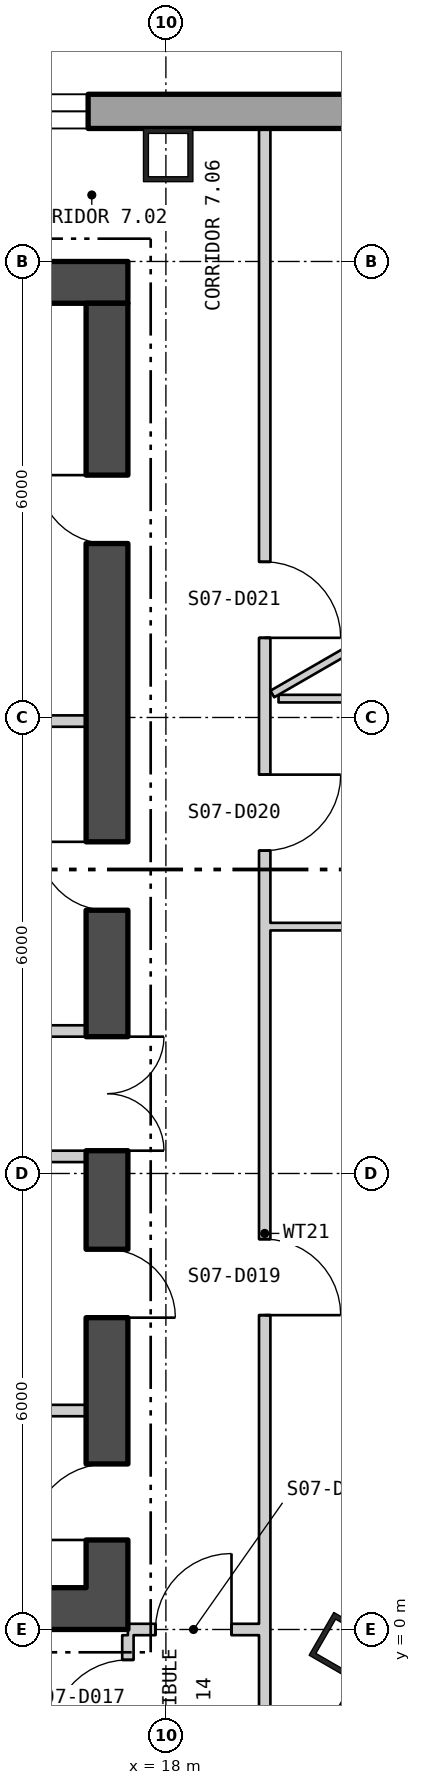
"""IFC4 building model, lengths in metres.
Left out: names, types, materials, properties, quantities, classifications, styles, units other than length and angle.
Written with IfcOpenShell. Run it as: python <this file> out.ifc"""

import sys

from ifc_helpers import new_model, si_unit, direction, frame, frame_2d, origin, origin_2d, place, context, subcontext, project, spatial, polyline, rectangle, hollow_rectangle, outline, extrude, element, fill, save


model = new_model("IFC4")
c1 = context("Model", 3, precision=1e-05, world=origin(), true_north=direction((0.0, 1.0)))
c2 = subcontext(c1, "Body", "Model", "MODEL_VIEW")
j1 = project(units=[si_unit("LENGTHUNIT", "METRE"), si_unit("PLANEANGLEUNIT", "RADIAN")], contexts=[c1])
p1 = place(None, origin())
s1 = spatial("IfcSite", under=j1, at=p1, CompositionType="ELEMENT")
p2 = place(p1, origin())
s2 = spatial("IfcBuilding", under=s1, at=p2, CompositionType="ELEMENT")
p3 = place(p2, frame((0.0, 0.0, 97.8)))
s3 = spatial("IfcBuildingStorey", under=s2, at=p3, CompositionType="ELEMENT", Elevation=97.8)
for number, where, z_axis, x_axis in (
    (1, (18.03, 19.4, 0.0), (0.0, 0.0, 1.0), (-1.0, 0.0, 0.0)),
    (2, (20.35, -0.232, 0.0), (0.0, 0.0, 1.0), (0.5, 0.866, 0.0)),
):
    element("IfcColumn", number, at=place(p3, frame(where, z_axis=z_axis, x_axis=x_axis)), inside=s3, PredefinedType="COLUMN", context=c2, shape_type="SweptSolid", body=[
        extrude(hollow_rectangle(XDim=0.65, YDim=0.7, WallThickness=0.065, at=origin_2d()), origin(), (0.0, 0.0, 1.0), 4.5),
    ])
p4 = place(p3, frame((22.87, 19.975, -0.4), z_axis=(0.0, 0.0, 1.0), x_axis=(-1.0, 0.0, 0.0)))
e3 = element("IfcWall", 3, at=p4, inside=s3, PredefinedType="SOLIDWALL", context=c2, shape_type="SweptSolid", body=[
    extrude(outline(polyline([(-0.13, -0.225), (45.87, -0.225), (45.61, 0.225), (0.13, 0.225), (-0.13, -0.225)])), origin(), (0.0, 0.0, 1.0), 4.5),
])
p5 = place(p4, frame((5.893, 0.0, 1.3)))
e4 = element("IfcOpeningElement", 4, at=p5, cuts=e3, PredefinedType="OPENING", context=c2, shape_type="SweptSolid", body=[
    extrude(rectangle(XDim=2.4, YDim=2.6, at=frame_2d((1.2, 1.3))), frame((0.0, 0.235, 0.0), z_axis=(0.0, -1.0, 0.0), x_axis=(1.0, 0.0, 0.0)), (0.0, 0.0, 1.0), 0.47),
])
p6 = place(p4, frame((10.401, 0.0, 1.3)))
e5 = element("IfcOpeningElement", 5, at=p6, cuts=e3, PredefinedType="OPENING", context=c2, shape_type="SweptSolid", body=[
    extrude(rectangle(XDim=2.4, YDim=2.6, at=frame_2d((1.2, 1.3))), frame((0.0, 0.235, 0.0), z_axis=(0.0, -1.0, 0.0), x_axis=(1.0, 0.0, 0.0)), (0.0, 0.0, 1.0), 0.47),
])
p7 = place(p4, frame((14.909, 0.0, 1.3)))
e6 = element("IfcOpeningElement", 6, at=p7, cuts=e3, PredefinedType="OPENING", context=c2, shape_type="SweptSolid", body=[
    extrude(rectangle(XDim=2.4, YDim=2.6, at=frame_2d((1.2, 1.3))), frame((0.0, 0.235, 0.0), z_axis=(0.0, -1.0, 0.0), x_axis=(1.0, 0.0, 0.0)), (0.0, 0.0, 1.0), 0.47),
])
p8 = place(p4, frame((19.416, 0.0, 1.3)))
e7 = element("IfcOpeningElement", 7, at=p8, cuts=e3, PredefinedType="OPENING", context=c2, shape_type="SweptSolid", body=[
    extrude(rectangle(XDim=2.4, YDim=2.6, at=frame_2d((1.2, 1.3))), frame((0.0, 0.235, 0.0), z_axis=(0.0, -1.0, 0.0), x_axis=(1.0, 0.0, 0.0)), (0.0, 0.0, 1.0), 0.47),
])
p9 = place(p4, frame((23.924, 0.0, 1.3)))
e8 = element("IfcOpeningElement", 8, at=p9, cuts=e3, PredefinedType="OPENING", context=c2, shape_type="SweptSolid", body=[
    extrude(rectangle(XDim=2.4, YDim=2.6, at=frame_2d((1.2, 1.3))), frame((0.0, 0.235, 0.0), z_axis=(0.0, -1.0, 0.0), x_axis=(1.0, 0.0, 0.0)), (0.0, 0.0, 1.0), 0.47),
])
p10 = place(p4, frame((28.431, 0.0, 1.3)))
e9 = element("IfcOpeningElement", 9, at=p10, cuts=e3, PredefinedType="OPENING", context=c2, shape_type="SweptSolid", body=[
    extrude(rectangle(XDim=2.4, YDim=2.6, at=frame_2d((1.2, 1.3))), frame((0.0, 0.235, 0.0), z_axis=(0.0, -1.0, 0.0), x_axis=(1.0, 0.0, 0.0)), (0.0, 0.0, 1.0), 0.47),
])
p11 = place(p4, frame((32.939, 0.0, 1.3)))
e10 = element("IfcOpeningElement", 10, at=p11, cuts=e3, PredefinedType="OPENING", context=c2, shape_type="SweptSolid", body=[
    extrude(rectangle(XDim=2.4, YDim=2.6, at=frame_2d((1.2, 1.3))), frame((0.0, 0.235, 0.0), z_axis=(0.0, -1.0, 0.0), x_axis=(1.0, 0.0, 0.0)), (0.0, 0.0, 1.0), 0.47),
])
p12 = place(p4, frame((37.447, 0.0, 1.3)))
e11 = element("IfcOpeningElement", 11, at=p12, cuts=e3, PredefinedType="OPENING", context=c2, shape_type="SweptSolid", body=[
    extrude(rectangle(XDim=2.4, YDim=2.6, at=frame_2d((1.2, 1.3))), frame((0.0, 0.235, 0.0), z_axis=(0.0, -1.0, 0.0), x_axis=(1.0, 0.0, 0.0)), (0.0, 0.0, 1.0), 0.47),
])
p13 = place(p4, frame((41.916, 0.0, 1.3)))
e12 = element("IfcOpeningElement", 12, at=p13, cuts=e3, PredefinedType="OPENING", context=c2, shape_type="SweptSolid", body=[
    extrude(rectangle(XDim=2.4, YDim=2.6, at=frame_2d((1.2, 1.3))), frame((0.0, 0.235, 0.0), z_axis=(0.0, -1.0, 0.0), x_axis=(1.0, 0.0, 0.0)), (0.0, 0.0, 1.0), 0.47),
])
p14 = place(p3, frame((4.905, -28.133, -0.18), z_axis=(0.0, 0.0, 1.0), x_axis=(0.500000711659, 0.866024992908, 0.0)))
e13 = element("IfcWall", 13, at=p14, inside=s3, PredefinedType="SOLIDWALL", context=c2, shape_type="SweptSolid", body=[
    extrude(outline(polyline([(-0.13, -0.225), (45.87, -0.225), (45.61, 0.225), (0.13, 0.225), (-0.13, -0.225)])), origin(), (0.0, 0.0, 1.0), 4.28),
])
p15 = place(p14, frame((1.424, 0.0, 1.08)))
e14 = element("IfcOpeningElement", 14, at=p15, cuts=e13, PredefinedType="OPENING", context=c2, shape_type="SweptSolid", body=[
    extrude(rectangle(XDim=2.4, YDim=2.6, at=frame_2d((1.2, 1.3))), frame((0.0, 0.235, 0.0), z_axis=(0.0, -1.0, 0.0), x_axis=(1.0, 0.0, 0.0)), (0.0, 0.0, 1.0), 0.47),
])
p16 = place(p14, frame((5.893, 0.0, 1.08)))
e15 = element("IfcOpeningElement", 15, at=p16, cuts=e13, PredefinedType="OPENING", context=c2, shape_type="SweptSolid", body=[
    extrude(rectangle(XDim=2.4, YDim=2.6, at=frame_2d((1.2, 1.3))), frame((0.0, 0.235, 0.0), z_axis=(0.0, -1.0, 0.0), x_axis=(1.0, 0.0, 0.0)), (0.0, 0.0, 1.0), 0.47),
])
p17 = place(p14, frame((10.401, 0.0, 1.08)))
e16 = element("IfcOpeningElement", 16, at=p17, cuts=e13, PredefinedType="OPENING", context=c2, shape_type="SweptSolid", body=[
    extrude(rectangle(XDim=2.4, YDim=2.6, at=frame_2d((1.2, 1.3))), frame((0.0, 0.235, 0.0), z_axis=(0.0, -1.0, 0.0), x_axis=(1.0, 0.0, 0.0)), (0.0, 0.0, 1.0), 0.47),
])
p18 = place(p14, frame((14.909, 0.0, 1.08)))
e17 = element("IfcOpeningElement", 17, at=p18, cuts=e13, PredefinedType="OPENING", context=c2, shape_type="SweptSolid", body=[
    extrude(rectangle(XDim=2.4, YDim=2.6, at=frame_2d((1.2, 1.3))), frame((0.0, 0.235, 0.0), z_axis=(0.0, -1.0, 0.0), x_axis=(1.0, 0.0, 0.0)), (0.0, 0.0, 1.0), 0.47),
])
p19 = place(p14, frame((19.416, 0.0, 1.08)))
e18 = element("IfcOpeningElement", 18, at=p19, cuts=e13, PredefinedType="OPENING", context=c2, shape_type="SweptSolid", body=[
    extrude(rectangle(XDim=2.4, YDim=2.6, at=frame_2d((1.2, 1.3))), frame((0.0, 0.235, 0.0), z_axis=(0.0, -1.0, 0.0), x_axis=(1.0, 0.0, 0.0)), (0.0, 0.0, 1.0), 0.47),
])
p20 = place(p14, frame((28.431, 0.0, 1.08)))
e19 = element("IfcOpeningElement", 19, at=p20, cuts=e13, PredefinedType="OPENING", context=c2, shape_type="SweptSolid", body=[
    extrude(rectangle(XDim=2.4, YDim=2.6, at=frame_2d((1.2, 1.3))), frame((0.0, 0.235, 0.0), z_axis=(0.0, -1.0, 0.0), x_axis=(1.0, 0.0, 0.0)), (0.0, 0.0, 1.0), 0.47),
])
p21 = place(p14, frame((32.939, 0.0, 1.08)))
e20 = element("IfcOpeningElement", 20, at=p21, cuts=e13, PredefinedType="OPENING", context=c2, shape_type="SweptSolid", body=[
    extrude(rectangle(XDim=2.4, YDim=2.6, at=frame_2d((1.2, 1.3))), frame((0.0, 0.235, 0.0), z_axis=(0.0, -1.0, 0.0), x_axis=(1.0, 0.0, 0.0)), (0.0, 0.0, 1.0), 0.47),
])
p22 = place(p14, frame((37.447, 0.0, 1.08)))
e21 = element("IfcOpeningElement", 21, at=p22, cuts=e13, PredefinedType="OPENING", context=c2, shape_type="SweptSolid", body=[
    extrude(rectangle(XDim=2.4, YDim=2.6, at=frame_2d((1.2, 1.3))), frame((0.0, 0.235, 0.0), z_axis=(0.0, -1.0, 0.0), x_axis=(1.0, 0.0, 0.0)), (0.0, 0.0, 1.0), 0.47),
])
p23 = place(p14, frame((41.916, 0.0, 1.08)))
e22 = element("IfcOpeningElement", 22, at=p23, cuts=e13, PredefinedType="OPENING", context=c2, shape_type="SweptSolid", body=[
    extrude(rectangle(XDim=2.4, YDim=2.6, at=frame_2d((1.2, 1.3))), frame((0.0, 0.235, 0.0), z_axis=(0.0, -1.0, 0.0), x_axis=(1.0, 0.0, 0.0)), (0.0, 0.0, 1.0), 0.47),
])
p24 = place(p3, frame((-17.5, 0.275, 0.0), z_axis=(0.0, 0.0, 1.0), x_axis=(1.0, 0.0, 0.0)))
e23 = element("IfcWall", 23, at=p24, inside=s3, PredefinedType="SHEAR", context=c2, shape_type="SweptSolid", body=[
    extrude(rectangle(XDim=35.0, YDim=0.55, at=frame_2d((17.5, 0.0))), origin(), (0.0, 0.0, 1.0), 4.3),
])
p25 = place(p24, frame((12.0, 0.0, 0.0)))
e24 = element("IfcOpeningElement", 24, at=p25, cuts=e23, PredefinedType="OPENING", context=c2, shape_type="SweptSolid", body=[
    extrude(rectangle(XDim=1.8, YDim=2.4, at=frame_2d((0.9, 1.2))), frame((0.0, 0.285, 0.0), z_axis=(0.0, -1.0, 0.0), x_axis=(1.0, 0.0, 0.0)), (0.0, 0.0, 1.0), 0.57),
])
p26 = place(p24, frame((22.0, 0.0, 0.0)))
e25 = element("IfcOpeningElement", 25, at=p26, cuts=e23, PredefinedType="OPENING", context=c2, shape_type="SweptSolid", body=[
    extrude(rectangle(XDim=1.8, YDim=2.4, at=frame_2d((0.9, 1.2))), frame((0.0, 0.285, 0.0), z_axis=(0.0, -1.0, 0.0), x_axis=(1.0, 0.0, 0.0)), (0.0, 0.0, 1.0), 0.57),
])
p27 = place(p3, frame((-17.5, 17.725, 0.0), z_axis=(0.0, 0.0, 1.0), x_axis=(1.0, 0.0, 0.0)))
e26 = element("IfcWall", 26, at=p27, inside=s3, PredefinedType="SHEAR", context=c2, shape_type="SweptSolid", body=[
    extrude(rectangle(XDim=35.0, YDim=0.55, at=frame_2d((17.5, 0.0))), origin(), (0.0, 0.0, 1.0), 4.3),
])
p28 = place(p3, frame((17.225, 0.55, 0.0), z_axis=(0.0, 0.0, 1.0), x_axis=(0.0, 1.0, 0.0)))
e27 = element("IfcWall", 27, at=p28, inside=s3, PredefinedType="SHEAR", context=c2, shape_type="SweptSolid", body=[
    extrude(rectangle(XDim=16.9, YDim=0.55, at=frame_2d((8.45, 0.0))), origin(), (0.0, 0.0, 1.0), 4.3),
])
p29 = place(p28, frame((5.75, 0.0, 0.0)))
e28 = element("IfcOpeningElement", 28, at=p29, cuts=e27, PredefinedType="OPENING", context=c2, shape_type="SweptSolid", body=[
    extrude(rectangle(XDim=1.5, YDim=2.1, at=frame_2d((0.75, 1.05))), frame((0.0, 0.285, 0.0), z_axis=(0.0, -1.0, 0.0), x_axis=(1.0, 0.0, 0.0)), (0.0, 0.0, 1.0), 0.57),
])
p30 = place(p28, frame((0.628, 0.0, 0.0)))
e29 = element("IfcOpeningElement", 29, at=p30, cuts=e27, PredefinedType="OPENING", context=c2, shape_type="SweptSolid", body=[
    extrude(rectangle(XDim=1.0, YDim=2.1, at=frame_2d((0.5, 1.05))), frame((0.0, 0.285, 0.0), z_axis=(0.0, -1.0, 0.0), x_axis=(1.0, 0.0, 0.0)), (0.0, 0.0, 1.0), 0.57),
])
p31 = place(p28, frame((3.553, 0.0, 0.0)))
e30 = element("IfcOpeningElement", 30, at=p31, cuts=e27, PredefinedType="OPENING", context=c2, shape_type="SweptSolid", body=[
    extrude(rectangle(XDim=0.9, YDim=2.1, at=frame_2d((0.45, 1.05))), frame((0.0, 0.285, 0.0), z_axis=(0.0, -1.0, 0.0), x_axis=(1.0, 0.0, 0.0)), (0.0, 0.0, 1.0), 0.57),
])
p32 = place(p28, frame((8.914, 0.0, 0.0)))
e31 = element("IfcOpeningElement", 31, at=p32, cuts=e27, PredefinedType="OPENING", context=c2, shape_type="SweptSolid", body=[
    extrude(rectangle(XDim=0.9, YDim=2.1, at=frame_2d((0.45, 1.05))), frame((0.0, 0.285, 0.0), z_axis=(0.0, -1.0, 0.0), x_axis=(1.0, 0.0, 0.0)), (0.0, 0.0, 1.0), 0.57),
])
p33 = place(p28, frame((13.739, 0.0, 0.0)))
e32 = element("IfcOpeningElement", 32, at=p33, cuts=e27, PredefinedType="OPENING", context=c2, shape_type="SweptSolid", body=[
    extrude(rectangle(XDim=0.9, YDim=2.1, at=frame_2d((0.45, 1.05))), frame((0.0, 0.285, 0.0), z_axis=(0.0, -1.0, 0.0), x_axis=(1.0, 0.0, 0.0)), (0.0, 0.0, 1.0), 0.57),
])
for number, where, z_axis, x_axis in (
    (33, (14.5, 6.225, 0.0), (0.0, 0.0, 1.0), (1.0, 0.0, 0.0)),
    (34, (14.5, 7.875, 0.0), (0.0, 0.0, 1.0), (1.0, 0.0, 0.0)),
    (35, (14.5, 2.881, 0.0), (0.0, 0.0, 1.0), (1.0, 0.0, 0.0)),
    (36, (14.5, 11.953, 0.0), (0.0, 0.0, 1.0), (1.0, 0.0, 0.0)),
):
    element("IfcWall", number, at=place(p3, frame(where, z_axis=z_axis, x_axis=x_axis)), inside=s3, PredefinedType="PARTITIONING", context=c2, shape_type="SweptSolid", body=[
        extrude(rectangle(XDim=2.45, YDim=0.15, at=frame_2d((1.225, 0.0))), origin(), (0.0, 0.0, 1.0), 4.3),
    ])
p34 = place(p3, frame((17.5, -1.725, 0.0), z_axis=(0.0, 0.0, 1.0), x_axis=(0.0, 1.0, 0.0)))
e37 = element("IfcWall", 37, at=p34, inside=s3, PredefinedType="PARTITIONING", context=c2, shape_type="SweptSolid", body=[
    extrude(rectangle(XDim=1.65, YDim=0.15, at=frame_2d((0.825, 0.0))), origin(), (0.0, 0.0, 1.0), 4.3),
])
p35 = place(p34, frame((0.325, 0.0, 0.0)))
e38 = element("IfcOpeningElement", 38, at=p35, cuts=e37, PredefinedType="OPENING", context=c2, shape_type="SweptSolid", body=[
    extrude(rectangle(XDim=1.0, YDim=2.1, at=frame_2d((0.5, 1.05))), frame((0.0, 0.085, 0.0), z_axis=(0.0, -1.0, 0.0), x_axis=(1.0, 0.0, 0.0)), (0.0, 0.0, 1.0), 0.17),
])
p36 = place(p3, frame((17.5, 0.0, 0.0), z_axis=(0.0, 0.0, 1.0), x_axis=(1.0, 0.0, 0.0)))
e39 = element("IfcWall", 39, at=p36, inside=s3, PredefinedType="PARTITIONING", context=c2, shape_type="SweptSolid", body=[
    extrude(rectangle(XDim=1.725, YDim=0.15, at=frame_2d((0.863, 0.0))), origin(), (0.0, 0.0, 1.0), 3.7),
])
p37 = place(p36, frame((0.363, 0.0, 0.0)))
e40 = element("IfcOpeningElement", 40, at=p37, cuts=e39, PredefinedType="OPENING", context=c2, shape_type="SweptSolid", body=[
    extrude(rectangle(XDim=1.0, YDim=2.1, at=frame_2d((0.5, 1.05))), frame((0.0, 0.085, 0.0), z_axis=(0.0, -1.0, 0.0), x_axis=(1.0, 0.0, 0.0)), (0.0, 0.0, 1.0), 0.17),
])
p38 = place(p3, frame((19.3, -1.875, 0.0), z_axis=(0.0, 0.0, 1.0), x_axis=(0.0, 1.0, 0.0)))
e41 = element("IfcWall", 41, at=p38, inside=s3, PredefinedType="PARTITIONING", context=c2, shape_type="SweptSolid", body=[
    extrude(rectangle(XDim=14.173, YDim=0.15, at=frame_2d((7.087, 0.0))), origin(), (0.0, 0.0, 1.0), 4.3),
])
p39 = place(p38, frame((6.011, 0.0, 0.0)))
e42 = element("IfcOpeningElement", 42, at=p39, cuts=e41, PredefinedType="OPENING", context=c2, shape_type="SweptSolid", body=[
    extrude(rectangle(XDim=1.0, YDim=2.1, at=frame_2d((0.5, 1.05))), frame((0.0, 0.085, 0.0), z_axis=(0.0, -1.0, 0.0), x_axis=(1.0, 0.0, 0.0)), (0.0, 0.0, 1.0), 0.17),
])
p40 = place(p38, frame((12.123, 0.0, 0.0)))
e43 = element("IfcOpeningElement", 43, at=p40, cuts=e41, PredefinedType="OPENING", context=c2, shape_type="SweptSolid", body=[
    extrude(rectangle(XDim=1.0, YDim=2.1, at=frame_2d((0.5, 1.05))), frame((0.0, 0.085, 0.0), z_axis=(0.0, -1.0, 0.0), x_axis=(1.0, 0.0, 0.0)), (0.0, 0.0, 1.0), 0.17),
])
p41 = place(p3, frame((19.3, 12.298, 0.0), z_axis=(0.0, 0.0, 1.0), x_axis=(0.0, 1.0, 0.0)))
e44 = element("IfcWall", 44, at=p41, inside=s3, PredefinedType="PARTITIONING", context=c2, shape_type="SweptSolid", body=[
    extrude(rectangle(XDim=7.451, YDim=0.15, at=frame_2d((3.725, 0.0))), origin(), (0.0, 0.0, 1.0), 4.3),
])
p42 = place(p41, frame((0.75, 0.0, 0.0)))
e45 = element("IfcOpeningElement", 45, at=p42, cuts=e44, PredefinedType="OPENING", context=c2, shape_type="SweptSolid", body=[
    extrude(rectangle(XDim=1.0, YDim=2.1, at=frame_2d((0.5, 1.05))), frame((0.0, 0.085, 0.0), z_axis=(0.0, -1.0, 0.0), x_axis=(1.0, 0.0, 0.0)), (0.0, 0.0, 1.0), 0.17),
])
p43 = place(p3, frame((19.375, 9.248, 0.0), z_axis=(0.0, 0.0, 1.0), x_axis=(1.0, 0.0, 0.0)))
e46 = element("IfcWall", 46, at=p43, inside=s3, PredefinedType="PARTITIONING", context=c2, shape_type="SweptSolid", body=[
    extrude(rectangle(XDim=2.925, YDim=0.1, at=frame_2d((1.462, 0.0))), origin(), (0.0, 0.0, 1.0), 4.3),
])
p44 = place(p3, frame((19.4, 12.309, 0.0), z_axis=(0.0, 0.0, 1.0), x_axis=(0.866158571006, 0.499769276639, 0.0)))
e47 = element("IfcWall", 47, at=p44, inside=s3, PredefinedType="PARTITIONING", context=c2, shape_type="SweptSolid", body=[
    extrude(rectangle(XDim=6.163, YDim=0.1, at=frame_2d((3.081, 0.0))), origin(), (0.0, 0.0, 1.0), 4.3),
])
p45 = place(p3, frame((19.482, 12.248, 0.0), z_axis=(0.0, 0.0, 1.0), x_axis=(1.0, 0.0, 0.0)))
e48 = element("IfcWall", 48, at=p45, inside=s3, PredefinedType="PARTITIONING", context=c2, shape_type="SweptSolid", body=[
    extrude(rectangle(XDim=2.818, YDim=0.1, at=frame_2d((1.409, 0.0))), origin(), (0.0, 0.0, 1.0), 4.3),
])
p46 = place(p5, origin())
e49 = element("IfcWindow", 49, at=p46, inside=s3, PartitioningType="SINGLE_PANEL", PredefinedType="WINDOW", context=c2, shape_type="SweptSolid", body=[
    extrude(rectangle(XDim=2.4, YDim=2.6, at=frame_2d((1.2, 1.3))), frame((0.0, 0.105, 0.0), z_axis=(0.0, -1.0, 0.0), x_axis=(1.0, 0.0, 0.0)), (0.0, 0.0, 1.0), 0.06),
])
fill(e4, e49)
p47 = place(p29, origin())
e50 = element("IfcDoor", 50, at=p47, inside=s3, OperationType="DOUBLE_DOOR_SINGLE_SWING", PredefinedType="DOOR", context=c2, shape_type="SweptSolid", body=[
    extrude(rectangle(XDim=1.5, YDim=2.1, at=frame_2d((0.75, 1.05))), frame((0.0, 0.025, 0.0), z_axis=(0.0, -1.0, 0.0), x_axis=(1.0, 0.0, 0.0)), (0.0, 0.0, 1.0), 0.05),
])
fill(e28, e50)
p48 = place(p30, origin())
e51 = element("IfcDoor", 51, at=p48, inside=s3, OperationType="SINGLE_SWING_RIGHT", PredefinedType="DOOR", context=c2, shape_type="SweptSolid", body=[
    extrude(rectangle(XDim=1.0, YDim=2.1, at=frame_2d((0.5, 1.05))), frame((0.0, 0.025, 0.0), z_axis=(0.0, -1.0, 0.0), x_axis=(1.0, 0.0, 0.0)), (0.0, 0.0, 1.0), 0.05),
])
fill(e29, e51)
p49 = place(p31, origin())
e52 = element("IfcDoor", 52, at=p49, inside=s3, OperationType="SINGLE_SWING_LEFT", PredefinedType="DOOR", context=c2, shape_type="SweptSolid", body=[
    extrude(rectangle(XDim=0.9, YDim=2.1, at=frame_2d((0.45, 1.05))), frame((0.0, 0.025, 0.0), z_axis=(0.0, -1.0, 0.0), x_axis=(1.0, 0.0, 0.0)), (0.0, 0.0, 1.0), 0.05),
])
fill(e30, e52)
p50 = place(p32, origin())
e53 = element("IfcDoor", 53, at=p50, inside=s3, OperationType="SINGLE_SWING_LEFT", PredefinedType="DOOR", context=c2, shape_type="SweptSolid", body=[
    extrude(rectangle(XDim=0.9, YDim=2.1, at=frame_2d((0.45, 1.05))), frame((0.0, 0.025, 0.0), z_axis=(0.0, -1.0, 0.0), x_axis=(1.0, 0.0, 0.0)), (0.0, 0.0, 1.0), 0.05),
])
fill(e31, e53)
p51 = place(p33, origin())
e54 = element("IfcDoor", 54, at=p51, inside=s3, OperationType="SINGLE_SWING_LEFT", PredefinedType="DOOR", context=c2, shape_type="SweptSolid", body=[
    extrude(rectangle(XDim=0.9, YDim=2.1, at=frame_2d((0.45, 1.05))), frame((0.0, 0.025, 0.0), z_axis=(0.0, -1.0, 0.0), x_axis=(1.0, 0.0, 0.0)), (0.0, 0.0, 1.0), 0.05),
])
fill(e32, e54)
p52 = place(p35, origin())
e55 = element("IfcDoor", 55, at=p52, inside=s3, OperationType="SINGLE_SWING_RIGHT", PredefinedType="DOOR", context=c2, shape_type="SweptSolid", body=[
    extrude(rectangle(XDim=1.0, YDim=2.1, at=frame_2d((0.5, 1.05))), frame((0.0, 0.025, 0.0), z_axis=(0.0, -1.0, 0.0), x_axis=(1.0, 0.0, 0.0)), (0.0, 0.0, 1.0), 0.05),
])
fill(e38, e55)
p53 = place(p37, origin())
e56 = element("IfcDoor", 56, at=p53, inside=s3, OperationType="SINGLE_SWING_LEFT", PredefinedType="DOOR", context=c2, shape_type="SweptSolid", body=[
    extrude(rectangle(XDim=1.0, YDim=2.1, at=frame_2d((0.5, 1.05))), frame((0.0, 0.025, 0.0), z_axis=(0.0, -1.0, 0.0), x_axis=(1.0, 0.0, 0.0)), (0.0, 0.0, 1.0), 0.05),
])
fill(e40, e56)
p54 = place(p39, origin())
e57 = element("IfcDoor", 57, at=p54, inside=s3, OperationType="SINGLE_SWING_LEFT", PredefinedType="DOOR", context=c2, shape_type="SweptSolid", body=[
    extrude(rectangle(XDim=1.0, YDim=2.1, at=frame_2d((0.5, 1.05))), frame((0.0, 0.025, 0.0), z_axis=(0.0, -1.0, 0.0), x_axis=(1.0, 0.0, 0.0)), (0.0, 0.0, 1.0), 0.05),
])
fill(e42, e57)
p55 = place(p40, origin())
e58 = element("IfcDoor", 58, at=p55, inside=s3, OperationType="SINGLE_SWING_RIGHT", PredefinedType="DOOR", context=c2, shape_type="SweptSolid", body=[
    extrude(rectangle(XDim=1.0, YDim=2.1, at=frame_2d((0.5, 1.05))), frame((0.0, 0.025, 0.0), z_axis=(0.0, -1.0, 0.0), x_axis=(1.0, 0.0, 0.0)), (0.0, 0.0, 1.0), 0.05),
])
fill(e43, e58)
p56 = place(p42, origin())
e59 = element("IfcDoor", 59, at=p56, inside=s3, OperationType="SINGLE_SWING_LEFT", PredefinedType="DOOR", context=c2, shape_type="SweptSolid", body=[
    extrude(rectangle(XDim=1.0, YDim=2.1, at=frame_2d((0.5, 1.05))), frame((0.0, 0.025, 0.0), z_axis=(0.0, -1.0, 0.0), x_axis=(1.0, 0.0, 0.0)), (0.0, 0.0, 1.0), 0.05),
])
fill(e45, e59)
save(model, sys.argv[1])
